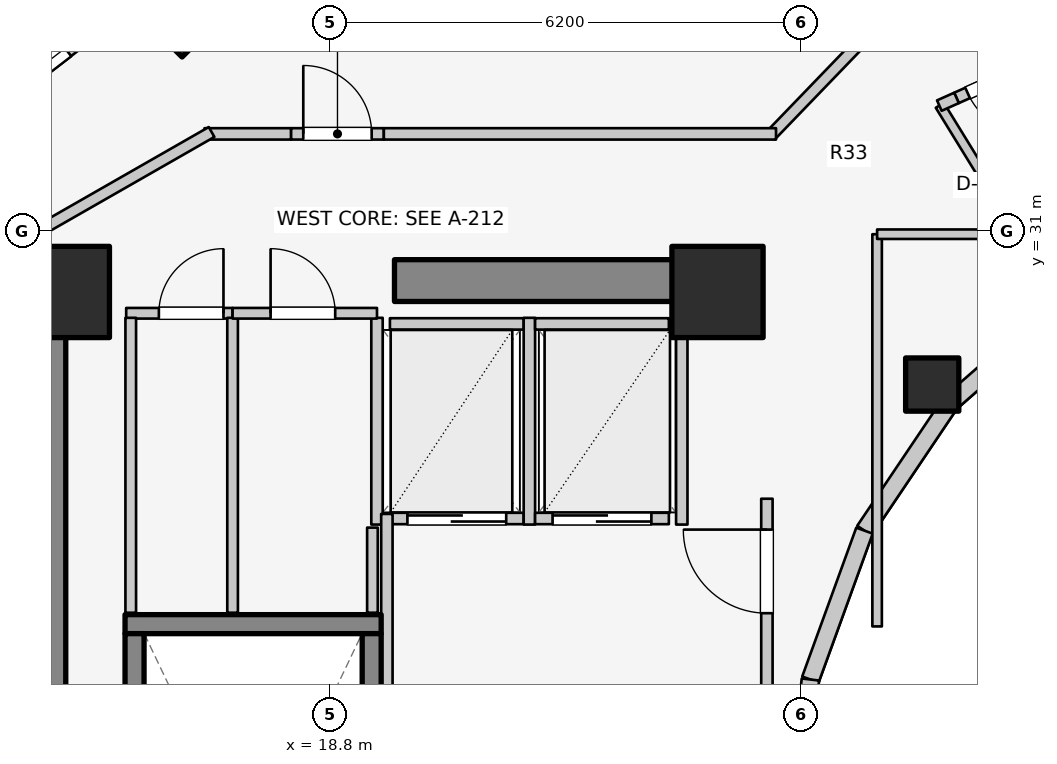
"""IFC4 building model, lengths in metres.
Left out: names, types, materials, properties, quantities, classifications, styles, units other than length and angle.
Written with IfcOpenShell. Run it as: python <this file> out.ifc"""

import sys

from ifc_helpers import new_model, si_unit, direction, frame, frame_2d, origin, origin_2d, place, context, subcontext, project, spatial, rectangle, extrude, element, fill, save


model = new_model("IFC4")
c1 = context("Model", 3, precision=1e-05, world=origin(), true_north=direction((0.0, 1.0)))
c2 = subcontext(c1, "Body", "Model", "MODEL_VIEW")
j1 = project(units=[si_unit("LENGTHUNIT", "METRE"), si_unit("PLANEANGLEUNIT", "RADIAN")], contexts=[c1])
p1 = place(None, origin())
s1 = spatial("IfcSite", under=j1, at=p1, CompositionType="ELEMENT")
p2 = place(p1, origin())
s2 = spatial("IfcBuilding", under=s1, at=p2, CompositionType="ELEMENT")
p3 = place(p2, frame((0.0, 0.0, 207.8)))
s3 = spatial("IfcBuildingStorey", under=s2, at=p3, CompositionType="ELEMENT", Elevation=207.8)
p4 = place(p3, frame((15.05, 17.05, 0.0), z_axis=(0.0, 0.0, 1.0), x_axis=(0.0, 1.0, 0.0)))
e1 = element("IfcWall", 1, at=p4, inside=s3, PredefinedType="SHEAR", context=c2, shape_type="SweptSolid", body=[
    extrude(rectangle(XDim=12.8, YDim=0.55, at=frame_2d((6.4, 0.0))), origin(), (0.0, 0.0, 1.0), 3.1),
])
p5 = place(p3, frame((19.65, 30.35, 0.0), z_axis=(0.0, 0.0, 1.0), x_axis=(1.0, 0.0, 0.0)))
e2 = element("IfcWall", 2, at=p5, inside=s3, PredefinedType="SHEAR", context=c2, shape_type="SweptSolid", body=[
    extrude(rectangle(XDim=4.5, YDim=0.55, at=frame_2d((2.25, 0.0))), origin(), (0.0, 0.0, 1.0), 3.1),
])
p6 = place(p3, frame((16.105, 25.83, 0.0), z_axis=(0.0, 0.0, 1.0), x_axis=(1.0, 0.0, 0.0)))
e3 = element("IfcWall", 3, at=p6, inside=s3, PredefinedType="SOLIDWALL", context=c2, shape_type="SweptSolid", body=[
    extrude(rectangle(XDim=3.37, YDim=0.25, at=frame_2d((1.685, 0.0))), origin(), (0.0, 0.0, 1.0), 3.1),
])
for number, where, z_axis, x_axis in (
    (4, (16.23, 17.895, 0.0), (0.0, 0.0, 1.0), (0.0, 1.0, 0.0)),
    (5, (19.35, 17.895, 0.0), (0.0, 0.0, 1.0), (0.0, 1.0, 0.0)),
):
    element("IfcWall", number, at=place(p3, frame(where, z_axis=z_axis, x_axis=x_axis)), inside=s3, PredefinedType="SOLIDWALL", context=c2, shape_type="SweptSolid", body=[
        extrude(rectangle(XDim=7.81, YDim=0.25, at=frame_2d((3.905, 0.0))), origin(), (0.0, 0.0, 1.0), 3.1),
    ])
for number, where, z_axis, x_axis in (
    (6, (23.9, 30.2, 0.0), (0.0, 0.0, 1.0), (1.0, 0.0, 0.0)),
    (7, (15.3, 30.2, 0.0), (0.0, 0.0, 1.0), (1.0, 0.0, 0.0)),
):
    element("IfcColumn", number, at=place(p3, frame(where, z_axis=z_axis, x_axis=x_axis)), inside=s3, PredefinedType="COLUMN", context=c2, shape_type="SweptSolid", body=[
        extrude(rectangle(XDim=1.2, YDim=1.2, at=origin_2d()), origin(), (0.0, 0.0, 1.0), 3.1),
    ])
p7 = place(p3, frame((26.725, 28.982, 0.0), z_axis=(0.0, 0.0, 1.0), x_axis=(1.0, 0.0, 0.0)))
e8 = element("IfcColumn", 8, at=p7, inside=s3, PredefinedType="COLUMN", context=c2, shape_type="SweptSolid", body=[
    extrude(rectangle(XDim=0.7, YDim=0.7, at=origin_2d()), origin(), (0.0, 0.0, 1.0), 3.1),
])
p8 = place(p3, frame((16.855, 33.857, 0.0), z_axis=(0.0, 0.0, 1.0), x_axis=(-0.707106781187, 0.707106781187, 0.0)))
e9 = element("IfcColumn", 9, at=p8, inside=s3, PredefinedType="COLUMN", context=c2, shape_type="SweptSolid", body=[
    extrude(rectangle(XDim=0.8, YDim=0.8, at=origin_2d()), origin(), (0.0, 0.0, 1.0), 3.1),
])
p9 = place(p3, frame((28.44, 30.032, 0.0), z_axis=(0.0, 0.0, 1.0), x_axis=(-0.752576694707, -0.658504607869, 0.0)))
e10 = element("IfcWall", 10, at=p9, inside=s3, PredefinedType="STANDARD", context=c2, shape_type="SweptSolid", body=[
    extrude(rectangle(XDim=1.959, YDim=0.23, at=frame_2d((0.98, 0.0))), origin(), (0.0, 0.0, 1.0), 1.22),
])
p10 = place(p3, frame((26.965, 28.742, 0.0), z_axis=(0.0, 0.0, 1.0), x_axis=(-0.558197800898, -0.829707909492, 0.0)))
e11 = element("IfcWall", 11, at=p10, inside=s3, PredefinedType="STANDARD", context=c2, shape_type="SweptSolid", body=[
    extrude(rectangle(XDim=2.027, YDim=0.23, at=frame_2d((1.013, 0.0))), origin(), (0.0, 0.0, 1.0), 1.22),
])
p11 = place(p3, frame((25.834, 27.06, 0.0), z_axis=(0.0, 0.0, 1.0), x_axis=(-0.341423187295, -0.93990968033, 0.0)))
e12 = element("IfcWall", 12, at=p11, inside=s3, PredefinedType="STANDARD", context=c2, shape_type="SweptSolid", body=[
    extrude(rectangle(XDim=2.084, YDim=0.23, at=frame_2d((1.042, 0.0))), origin(), (0.0, 0.0, 1.0), 2.56),
])
p12 = place(p3, frame((25.123, 25.102, 0.0), z_axis=(0.0, 0.0, 1.0), x_axis=(-0.114711713601, -0.993398823617, 0.0)))
e13 = element("IfcWall", 13, at=p12, inside=s3, PredefinedType="STANDARD", context=c2, shape_type="SweptSolid", body=[
    extrude(rectangle(XDim=2.115, YDim=0.23, at=frame_2d((1.058, 0.0))), origin(), (0.0, 0.0, 1.0), 2.56),
])
p13 = place(p3, frame((16.442, 34.272, 0.0), z_axis=(0.0, 0.0, 1.0), x_axis=(-0.792713817907, -0.609593965603, 0.0)))
e14 = element("IfcWall", 14, at=p13, inside=s3, PredefinedType="STANDARD", context=c2, shape_type="SweptSolid", body=[
    extrude(rectangle(XDim=4.041, YDim=0.26, at=frame_2d((2.021, 0.0))), origin(), (0.0, 0.0, 1.0), 1.22),
])
p14 = place(p13, frame((1.42, 0.0, 0.15)))
e15 = element("IfcOpeningElement", 15, at=p14, cuts=e14, PredefinedType="OPENING", context=c2, shape_type="SweptSolid", body=[
    extrude(rectangle(XDim=1.2, YDim=0.9, at=frame_2d((0.6, 0.45))), frame((0.0, 0.14, 0.0), z_axis=(0.0, -1.0, 0.0), x_axis=(1.0, 0.0, 0.0)), (0.0, 0.0, 1.0), 0.28),
])
p15 = place(p3, frame((19.59, 27.22, 0.0), z_axis=(0.0, 0.0, 1.0), x_axis=(1.0, 0.0, 0.0)))
e16 = element("IfcWall", 16, at=p15, inside=s3, PredefinedType="SOLIDWALL", context=c2, shape_type="SweptSolid", body=[
    extrude(rectangle(XDim=1.76, YDim=0.15, at=frame_2d((0.88, 0.0))), origin(), (0.0, 0.0, 1.0), 2.575),
])
p16 = place(p15, frame((0.23, 0.0, 0.0)))
e17 = element("IfcOpeningElement", 17, at=p16, cuts=e16, PredefinedType="OPENING", context=c2, shape_type="SweptSolid", body=[
    extrude(rectangle(XDim=1.3, YDim=2.1, at=frame_2d((0.65, 1.05))), frame((0.0, 0.085, 0.0), z_axis=(0.0, -1.0, 0.0), x_axis=(1.0, 0.0, 0.0)), (0.0, 0.0, 1.0), 0.17),
])
p17 = place(p3, frame((19.59, 29.78, 0.0), z_axis=(0.0, 0.0, 1.0), x_axis=(1.0, 0.0, 0.0)))
e18 = element("IfcWall", 18, at=p17, inside=s3, PredefinedType="SOLIDWALL", context=c2, shape_type="SweptSolid", body=[
    extrude(rectangle(XDim=1.76, YDim=0.15, at=frame_2d((0.88, 0.0))), origin(), (0.0, 0.0, 1.0), 2.575),
])
for number, where, z_axis, x_axis in (
    (19, (19.42, 27.14, 0.0), (0.0, 0.0, 1.0), (0.0, 1.0, 0.0)),
    (20, (21.425, 27.14, 0.0), (0.0, 0.0, 1.0), (0.0, 1.0, 0.0)),
):
    element("IfcWall", number, at=place(p3, frame(where, z_axis=z_axis, x_axis=x_axis)), inside=s3, PredefinedType="SOLIDWALL", context=c2, shape_type="SweptSolid", body=[
        extrude(rectangle(XDim=2.72, YDim=0.15, at=frame_2d((1.36, 0.0))), origin(), (0.0, 0.0, 1.0), 2.575),
    ])
p18 = place(p3, frame((21.5, 27.22, 0.0), z_axis=(0.0, 0.0, 1.0), x_axis=(1.0, 0.0, 0.0)))
e21 = element("IfcWall", 21, at=p18, inside=s3, PredefinedType="SOLIDWALL", context=c2, shape_type="SweptSolid", body=[
    extrude(rectangle(XDim=1.76, YDim=0.15, at=frame_2d((0.88, 0.0))), origin(), (0.0, 0.0, 1.0), 2.575),
])
p19 = place(p18, frame((0.23, 0.0, 0.0)))
e22 = element("IfcOpeningElement", 22, at=p19, cuts=e21, PredefinedType="OPENING", context=c2, shape_type="SweptSolid", body=[
    extrude(rectangle(XDim=1.3, YDim=2.1, at=frame_2d((0.65, 1.05))), frame((0.0, 0.085, 0.0), z_axis=(0.0, -1.0, 0.0), x_axis=(1.0, 0.0, 0.0)), (0.0, 0.0, 1.0), 0.17),
])
p20 = place(p3, frame((21.5, 29.78, 0.0), z_axis=(0.0, 0.0, 1.0), x_axis=(1.0, 0.0, 0.0)))
e23 = element("IfcWall", 23, at=p20, inside=s3, PredefinedType="SOLIDWALL", context=c2, shape_type="SweptSolid", body=[
    extrude(rectangle(XDim=1.76, YDim=0.15, at=frame_2d((0.88, 0.0))), origin(), (0.0, 0.0, 1.0), 2.575),
])
p21 = place(p3, frame((23.43, 27.14, 0.0), z_axis=(0.0, 0.0, 1.0), x_axis=(0.0, 1.0, 0.0)))
e24 = element("IfcWall", 24, at=p21, inside=s3, PredefinedType="SOLIDWALL", context=c2, shape_type="SweptSolid", body=[
    extrude(rectangle(XDim=2.72, YDim=0.15, at=frame_2d((1.36, 0.0))), origin(), (0.0, 0.0, 1.0), 2.575),
])
p22 = place(p3, frame((19.55, 24.08, 0.0), z_axis=(0.0, 0.0, 1.0), x_axis=(0.0, 1.0, 0.0)))
e25 = element("IfcWall", 25, at=p22, inside=s3, PredefinedType="PARTITIONING", context=c2, shape_type="SweptSolid", body=[
    extrude(rectangle(XDim=3.2, YDim=0.15, at=frame_2d((1.6, 0.0))), origin(), (0.0, 0.0, 1.0), 2.575),
])
p23 = place(p3, frame((24.55, 24.08, 0.0), z_axis=(0.0, 0.0, 1.0), x_axis=(0.0, 1.0, 0.0)))
e26 = element("IfcWall", 26, at=p23, inside=s3, PredefinedType="PARTITIONING", context=c2, shape_type="SweptSolid", body=[
    extrude(rectangle(XDim=3.4, YDim=0.15, at=frame_2d((1.7, 0.0))), origin(), (0.0, 0.0, 1.0), 2.575),
])
p24 = place(p23, frame((1.894, 0.0, 0.0)))
e27 = element("IfcOpeningElement", 27, at=p24, cuts=e26, PredefinedType="OPENING", context=c2, shape_type="SweptSolid", body=[
    extrude(rectangle(XDim=1.1, YDim=2.1, at=frame_2d((0.55, 1.05))), frame((0.0, 0.085, 0.0), z_axis=(0.0, -1.0, 0.0), x_axis=(1.0, 0.0, 0.0)), (0.0, 0.0, 1.0), 0.17),
])
p25 = place(p3, frame((16.12, 29.92, 0.0), z_axis=(0.0, 0.0, 1.0), x_axis=(1.0, 0.0, 0.0)))
e28 = element("IfcWall", 28, at=p25, inside=s3, PredefinedType="PLUMBINGWALL", context=c2, shape_type="SweptSolid", body=[
    extrude(rectangle(XDim=1.4, YDim=0.14, at=frame_2d((0.7, 0.0))), origin(), (0.0, 0.0, 1.0), 2.575),
])
p26 = place(p25, frame((0.43, 0.0, 0.0)))
e29 = element("IfcOpeningElement", 29, at=p26, cuts=e28, PredefinedType="OPENING", context=c2, shape_type="SweptSolid", body=[
    extrude(rectangle(XDim=0.85, YDim=2.05, at=frame_2d((0.425, 1.025))), frame((0.0, 0.08, 0.0), z_axis=(0.0, -1.0, 0.0), x_axis=(1.0, 0.0, 0.0)), (0.0, 0.0, 1.0), 0.16),
])
for number, where, z_axis, x_axis in (
    (30, (16.18, 25.98, 0.0), (0.0, 0.0, 1.0), (0.0, 1.0, 0.0)),
    (31, (17.52, 25.98, 0.0), (0.0, 0.0, 1.0), (0.0, 1.0, 0.0)),
):
    element("IfcWall", number, at=place(p3, frame(where, z_axis=z_axis, x_axis=x_axis)), inside=s3, PredefinedType="PLUMBINGWALL", context=c2, shape_type="SweptSolid", body=[
        extrude(rectangle(XDim=3.88, YDim=0.14, at=frame_2d((1.94, 0.0))), origin(), (0.0, 0.0, 1.0), 2.575),
    ])
p27 = place(p3, frame((17.52, 29.92, 0.0), z_axis=(0.0, 0.0, 1.0), x_axis=(1.0, 0.0, 0.0)))
e32 = element("IfcWall", 32, at=p27, inside=s3, PredefinedType="PLUMBINGWALL", context=c2, shape_type="SweptSolid", body=[
    extrude(rectangle(XDim=1.9, YDim=0.14, at=frame_2d((0.95, 0.0))), origin(), (0.0, 0.0, 1.0), 2.575),
])
p28 = place(p27, frame((0.5, 0.0, 0.0)))
e33 = element("IfcOpeningElement", 33, at=p28, cuts=e32, PredefinedType="OPENING", context=c2, shape_type="SweptSolid", body=[
    extrude(rectangle(XDim=0.85, YDim=2.05, at=frame_2d((0.425, 1.025))), frame((0.0, 0.08, 0.0), z_axis=(0.0, -1.0, 0.0), x_axis=(1.0, 0.0, 0.0)), (0.0, 0.0, 1.0), 0.16),
])
p29 = place(p3, frame((19.36, 25.98, 0.0), z_axis=(0.0, 0.0, 1.0), x_axis=(0.0, 1.0, 0.0)))
e34 = element("IfcWall", 34, at=p29, inside=s3, PredefinedType="PLUMBINGWALL", context=c2, shape_type="SweptSolid", body=[
    extrude(rectangle(XDim=1.12, YDim=0.14, at=frame_2d((0.56, 0.0))), origin(), (0.0, 0.0, 1.0), 2.575),
])
p30 = place(p3, frame((28.45, 30.015, 0.0), z_axis=(0.0, 0.0, 1.0), x_axis=(-0.523992004803, 0.851723182086, 0.0)))
e35 = element("IfcWall", 35, at=p30, inside=s3, PredefinedType="PARTITIONING", context=c2, shape_type="SweptSolid", body=[
    extrude(rectangle(XDim=3.101, YDim=0.125, at=frame_2d((1.551, 0.0))), origin(), (0.0, 0.0, 1.0), 2.096),
])
p31 = place(p3, frame((28.204, 33.271, 0.0), z_axis=(0.0, 0.0, 1.0), x_axis=(-0.913104656548, -0.407725258219, 0.0)))
e36 = element("IfcWall", 36, at=p31, inside=s3, PredefinedType="PARTITIONING", context=c2, shape_type="SweptSolid", body=[
    extrude(rectangle(XDim=1.27, YDim=0.15, at=frame_2d((0.635, 0.0))), origin(), (0.0, 0.0, 1.0), 2.16),
])
p32 = place(p31, frame((0.16, 0.0, 0.0)))
e37 = element("IfcOpeningElement", 37, at=p32, cuts=e36, PredefinedType="OPENING", context=c2, shape_type="SweptSolid", body=[
    extrude(rectangle(XDim=0.95, YDim=2.1, at=frame_2d((0.475, 1.05))), frame((0.0, 0.085, 0.0), z_axis=(0.0, -1.0, 0.0), x_axis=(1.0, 0.0, 0.0)), (0.0, 0.0, 1.0), 0.17),
])
p33 = place(p3, frame((27.045, 32.753, 0.0), z_axis=(0.0, 0.0, 1.0), x_axis=(-0.913282054518, -0.407327741378, 0.0)))
e38 = element("IfcWall", 38, at=p33, inside=s3, PredefinedType="PARTITIONING", context=c2, shape_type="SweptSolid", body=[
    extrude(rectangle(XDim=0.248, YDim=0.15, at=frame_2d((0.124, 0.0))), origin(), (0.0, 0.0, 1.0), 2.575),
])
p34 = place(p3, frame((26.0, 25.8, 0.0), z_axis=(0.0, 0.0, 1.0), x_axis=(0.0, 1.0, 0.0)))
e39 = element("IfcWall", 39, at=p34, inside=s3, PredefinedType="PARTITIONING", context=c2, shape_type="SweptSolid", body=[
    extrude(rectangle(XDim=5.16, YDim=0.125, at=frame_2d((2.58, 0.0))), origin(), (0.0, 0.0, 1.0), 1.952),
])
p35 = place(p3, frame((26.0, 30.96, 0.0), z_axis=(0.0, 0.0, 1.0), x_axis=(1.0, 0.0, 0.0)))
e40 = element("IfcWall", 40, at=p35, inside=s3, PredefinedType="PARTITIONING", context=c2, shape_type="SweptSolid", body=[
    extrude(rectangle(XDim=2.6, YDim=0.125, at=frame_2d((1.3, 0.0))), origin(), (0.0, 0.0, 1.0), 2.096),
])
p36 = place(p3, frame((26.097, 33.812, 0.0), z_axis=(0.0, 0.0, 1.0), x_axis=(-0.694032962553, -0.719943224768, 0.0)))
e41 = element("IfcWall", 41, at=p36, inside=s3, PredefinedType="PARTITIONING", context=c2, shape_type="SweptSolid", body=[
    extrude(rectangle(XDim=2.158, YDim=0.15, at=frame_2d((1.079, 0.0))), origin(), (0.0, 0.0, 1.0), 2.096),
])
p37 = place(p3, frame((17.15, 32.28, 0.0), z_axis=(0.0, 0.0, 1.0), x_axis=(1.0, 0.0, 0.0)))
e42 = element("IfcWall", 42, at=p37, inside=s3, PredefinedType="PARTITIONING", context=c2, shape_type="SweptSolid", body=[
    extrude(rectangle(XDim=1.14, YDim=0.15, at=frame_2d((0.57, 0.0))), origin(), (0.0, 0.0, 1.0), 2.575),
])
p38 = place(p3, frame((18.29, 32.28, 0.0), z_axis=(0.0, 0.0, 1.0), x_axis=(1.0, 0.0, 0.0)))
e43 = element("IfcWall", 43, at=p38, inside=s3, PredefinedType="PARTITIONING", context=c2, shape_type="SweptSolid", body=[
    extrude(rectangle(XDim=1.22, YDim=0.15, at=frame_2d((0.61, 0.0))), origin(), (0.0, 0.0, 1.0), 2.16),
])
p39 = place(p38, frame((0.16, 0.0, 0.0)))
e44 = element("IfcOpeningElement", 44, at=p39, cuts=e43, PredefinedType="OPENING", context=c2, shape_type="SweptSolid", body=[
    extrude(rectangle(XDim=0.9, YDim=2.1, at=frame_2d((0.45, 1.05))), frame((0.0, 0.085, 0.0), z_axis=(0.0, -1.0, 0.0), x_axis=(1.0, 0.0, 0.0)), (0.0, 0.0, 1.0), 0.17),
])
p40 = place(p3, frame((19.51, 32.28, 0.0), z_axis=(0.0, 0.0, 1.0), x_axis=(1.0, 0.0, 0.0)))
e45 = element("IfcWall", 45, at=p40, inside=s3, PredefinedType="PARTITIONING", context=c2, shape_type="SweptSolid", body=[
    extrude(rectangle(XDim=5.16, YDim=0.15, at=frame_2d((2.58, 0.0))), origin(), (0.0, 0.0, 1.0), 2.096),
])
p41 = place(p3, frame((17.243, 32.305, 0.0), z_axis=(0.0, 0.0, 1.0), x_axis=(-0.867991349648, -0.496579315857, 0.0)))
e46 = element("IfcWall", 46, at=p41, inside=s3, PredefinedType="PARTITIONING", context=c2, shape_type="SweptSolid", body=[
    extrude(rectangle(XDim=2.567, YDim=0.15, at=frame_2d((1.283, 0.0))), origin(), (0.0, 0.0, 1.0), 1.22),
])
p42 = place(p14, origin())
e47 = element("IfcWindow", 47, at=p42, inside=s3, PartitioningType="SINGLE_PANEL", PredefinedType="WINDOW", context=c2, shape_type="SweptSolid", body=[
    extrude(rectangle(XDim=1.2, YDim=0.9, at=frame_2d((0.6, 0.45))), frame((0.0, 0.03, 0.0), z_axis=(0.0, -1.0, 0.0), x_axis=(1.0, 0.0, 0.0)), (0.0, 0.0, 1.0), 0.06),
])
fill(e15, e47)
p43 = place(p16, origin())
e48 = element("IfcDoor", 48, at=p43, inside=s3, OperationType="DOUBLE_DOOR_SLIDING", PredefinedType="DOOR", context=c2, shape_type="SweptSolid", body=[
    extrude(rectangle(XDim=1.3, YDim=2.1, at=frame_2d((0.65, 1.05))), frame((0.0, 0.025, 0.0), z_axis=(0.0, -1.0, 0.0), x_axis=(1.0, 0.0, 0.0)), (0.0, 0.0, 1.0), 0.05),
])
fill(e17, e48)
p44 = place(p19, origin())
e49 = element("IfcDoor", 49, at=p44, inside=s3, OperationType="DOUBLE_DOOR_SLIDING", PredefinedType="DOOR", context=c2, shape_type="SweptSolid", body=[
    extrude(rectangle(XDim=1.3, YDim=2.1, at=frame_2d((0.65, 1.05))), frame((0.0, 0.025, 0.0), z_axis=(0.0, -1.0, 0.0), x_axis=(1.0, 0.0, 0.0)), (0.0, 0.0, 1.0), 0.05),
])
fill(e22, e49)
p45 = place(p24, origin())
e50 = element("IfcDoor", 50, at=p45, inside=s3, OperationType="SINGLE_SWING_RIGHT", PredefinedType="DOOR", context=c2, shape_type="SweptSolid", body=[
    extrude(rectangle(XDim=1.1, YDim=2.1, at=frame_2d((0.55, 1.05))), frame((0.0, 0.025, 0.0), z_axis=(0.0, -1.0, 0.0), x_axis=(1.0, 0.0, 0.0)), (0.0, 0.0, 1.0), 0.05),
])
fill(e27, e50)
p46 = place(p26, origin())
e51 = element("IfcDoor", 51, at=p46, inside=s3, OperationType="SINGLE_SWING_RIGHT", PredefinedType="DOOR", context=c2, shape_type="SweptSolid", body=[
    extrude(rectangle(XDim=0.85, YDim=2.05, at=frame_2d((0.425, 1.025))), frame((0.0, 0.025, 0.0), z_axis=(0.0, -1.0, 0.0), x_axis=(1.0, 0.0, 0.0)), (0.0, 0.0, 1.0), 0.05),
])
fill(e29, e51)
p47 = place(p28, origin())
e52 = element("IfcDoor", 52, at=p47, inside=s3, OperationType="SINGLE_SWING_LEFT", PredefinedType="DOOR", context=c2, shape_type="SweptSolid", body=[
    extrude(rectangle(XDim=0.85, YDim=2.05, at=frame_2d((0.425, 1.025))), frame((0.0, 0.025, 0.0), z_axis=(0.0, -1.0, 0.0), x_axis=(1.0, 0.0, 0.0)), (0.0, 0.0, 1.0), 0.05),
])
fill(e33, e52)
p48 = place(p32, origin())
e53 = element("IfcDoor", 53, at=p48, inside=s3, OperationType="SINGLE_SWING_LEFT", PredefinedType="DOOR", context=c2, shape_type="SweptSolid", body=[
    extrude(rectangle(XDim=0.95, YDim=2.1, at=frame_2d((0.475, 1.05))), frame((0.0, 0.025, 0.0), z_axis=(0.0, -1.0, 0.0), x_axis=(1.0, 0.0, 0.0)), (0.0, 0.0, 1.0), 0.05),
])
fill(e37, e53)
p49 = place(p39, origin())
e54 = element("IfcDoor", 54, at=p49, inside=s3, OperationType="SINGLE_SWING_LEFT", PredefinedType="DOOR", context=c2, shape_type="SweptSolid", body=[
    extrude(rectangle(XDim=0.9, YDim=2.1, at=frame_2d((0.45, 1.05))), frame((0.0, 0.025, 0.0), z_axis=(0.0, -1.0, 0.0), x_axis=(1.0, 0.0, 0.0)), (0.0, 0.0, 1.0), 0.05),
])
fill(e44, e54)
save(model, sys.argv[1])
